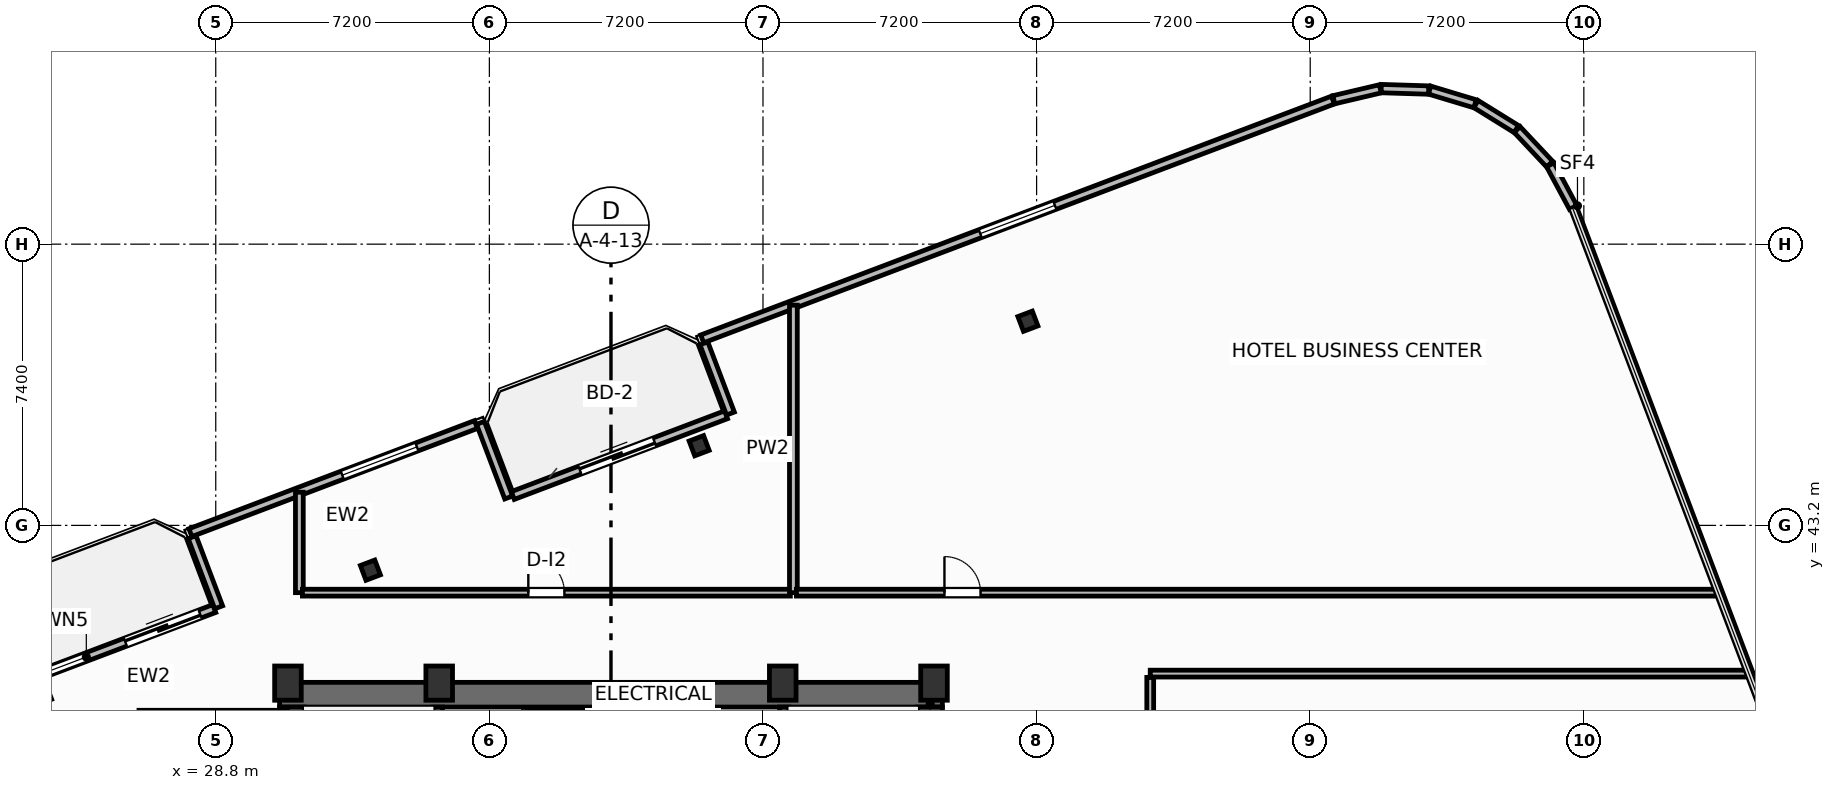
"""IFC4 building model, lengths in metres.
Left out: names, types, materials, properties, quantities, classifications, styles, units other than length and angle.
Written with IfcOpenShell. Run it as: python <this file> out.ifc"""

import sys

from ifc_helpers import new_model, si_unit, direction, frame, frame_2d, origin, origin_2d, place, context, subcontext, project, spatial, rectangle, i_section, extrude, element, fill, save


model = new_model("IFC4")
c1 = context("Model", 3, precision=1e-05, world=origin(), true_north=direction((0.0, 1.0)))
c2 = subcontext(c1, "Body", "Model", "MODEL_VIEW")
j1 = project(units=[si_unit("LENGTHUNIT", "METRE"), si_unit("PLANEANGLEUNIT", "RADIAN")], contexts=[c1])
p1 = place(None, origin())
s1 = spatial("IfcSite", under=j1, at=p1, CompositionType="ELEMENT")
p2 = place(p1, origin())
s2 = spatial("IfcBuilding", under=s1, at=p2, CompositionType="ELEMENT")
p3 = place(p2, frame((0.0, 0.0, 227.5)))
s3 = spatial("IfcBuildingStorey", under=s2, at=p3, CompositionType="ELEMENT", Elevation=227.5)
for number, where, z_axis, x_axis in (
    (1, (30.7, 39.05, 0.0), (0.0, 0.0, 1.0), (1.0, 0.0, 0.0)),
    (2, (34.68, 39.05, 0.0), (0.0, 0.0, 1.0), (1.0, 0.0, 0.0)),
    (3, (43.72, 39.05, 0.0), (0.0, 0.0, 1.0), (1.0, 0.0, 0.0)),
    (4, (47.7, 39.05, 0.0), (0.0, 0.0, 1.0), (1.0, 0.0, 0.0)),
):
    element("IfcColumn", number, at=place(p3, frame(where, z_axis=z_axis, x_axis=x_axis)), inside=s3, PredefinedType="COLUMN", context=c2, shape_type="SweptSolid", body=[
        extrude(rectangle(XDim=0.7, YDim=0.9, at=origin_2d()), origin(), (0.0, 0.0, 1.0), 3.7),
    ])
p4 = place(p3, frame((30.48, 38.745, 0.0), z_axis=(0.0, 0.0, 1.0), x_axis=(1.0, 0.0, 0.0)))
e5 = element("IfcWall", 5, at=p4, inside=s3, PredefinedType="SHEAR", context=c2, shape_type="SweptSolid", body=[
    extrude(rectangle(XDim=17.44, YDim=0.65, at=frame_2d((8.72, 0.0))), origin(), (0.0, 0.0, 1.0), 3.45),
])
for number, where, z_axis, x_axis in (
    (6, (30.805, 29.2, 0.0), (0.0, 0.0, 1.0), (0.0, 1.0, 0.0)),
    (7, (47.595, 29.2, 0.0), (0.0, 0.0, 1.0), (0.0, 1.0, 0.0)),
):
    element("IfcWall", number, at=place(p3, frame(where, z_axis=z_axis, x_axis=x_axis)), inside=s3, PredefinedType="SHEAR", context=c2, shape_type="SweptSolid", body=[
        extrude(rectangle(XDim=9.22, YDim=0.65, at=frame_2d((4.61, 0.0))), origin(), (0.0, 0.0, 1.0), 3.45),
    ])
p5 = place(p3, frame((34.64, 29.2, 0.0), z_axis=(0.0, 0.0, 1.0), x_axis=(0.0, 1.0, 0.0)))
e8 = element("IfcWall", 8, at=p5, inside=s3, PredefinedType="SHEAR", context=c2, shape_type="SweptSolid", body=[
    extrude(rectangle(XDim=9.22, YDim=0.25, at=frame_2d((4.61, 0.0))), origin(), (0.0, 0.0, 1.0), 3.45),
])
p6 = place(p5, frame((0.65, 0.0, 0.0)))
e9 = element("IfcOpeningElement", 9, at=p6, cuts=e8, PredefinedType="OPENING", context=c2, shape_type="SweptSolid", body=[
    extrude(rectangle(XDim=1.05, YDim=2.15, at=frame_2d((0.525, 1.075))), frame((0.0, 0.135, 0.0), z_axis=(0.0, -1.0, 0.0), x_axis=(1.0, 0.0, 0.0)), (0.0, 0.0, 1.0), 0.27),
])
p7 = place(p3, frame((43.76, 29.2, 0.0), z_axis=(0.0, 0.0, 1.0), x_axis=(0.0, 1.0, 0.0)))
e10 = element("IfcWall", 10, at=p7, inside=s3, PredefinedType="SHEAR", context=c2, shape_type="SweptSolid", body=[
    extrude(rectangle(XDim=9.22, YDim=0.25, at=frame_2d((4.61, 0.0))), origin(), (0.0, 0.0, 1.0), 3.45),
])
p8 = place(p7, frame((0.65, 0.0, 0.0)))
e11 = element("IfcOpeningElement", 11, at=p8, cuts=e10, PredefinedType="OPENING", context=c2, shape_type="SweptSolid", body=[
    extrude(rectangle(XDim=1.05, YDim=2.15, at=frame_2d((0.525, 1.075))), frame((0.0, 0.135, 0.0), z_axis=(0.0, -1.0, 0.0), x_axis=(1.0, 0.0, 0.0)), (0.0, 0.0, 1.0), 0.27),
])
for number, where, z_axis, x_axis in (
    (12, (50.171, 48.572, 0.0), (0.0, 0.0, 1.0), (0.935, 0.354, 0.0)),
    (13, (41.52, 45.297, 0.0), (0.0, 0.0, 1.0), (0.935, 0.354, 0.0)),
    (14, (32.869, 42.022, 0.0), (0.0, 0.0, 1.0), (0.935, 0.354, 0.0)),
):
    element("IfcColumn", number, at=place(p3, frame(where, z_axis=z_axis, x_axis=x_axis)), inside=s3, PredefinedType="COLUMN", context=c2, shape_type="SweptSolid", body=[
        extrude(i_section(OverallWidth=0.406, OverallDepth=0.416, WebThickness=0.03, FlangeThickness=0.048, FilletRadius=0.025, at=origin_2d()), origin(), (0.0, 0.0, 1.0), 3.7),
    ])
p9 = place(p3, frame((23.149, 38.887, 0.0), z_axis=(0.0, 0.0, 1.0), x_axis=(0.9352192676, 0.354069091436, 0.0)))
e15 = element("IfcWall", 15, at=p9, inside=s3, PredefinedType="SOLIDWALL", context=c2, shape_type="SweptSolid", body=[
    extrude(rectangle(XDim=6.0, YDim=0.22, at=frame_2d((3.0, 0.0))), origin(), (0.0, 0.0, 1.0), 2.73),
])
p10 = place(p9, frame((3.5, 0.0, 0.0)))
e16 = element("IfcOpeningElement", 16, at=p10, cuts=e15, PredefinedType="OPENING", context=c2, shape_type="SweptSolid", body=[
    extrude(rectangle(XDim=2.1, YDim=2.3, at=frame_2d((1.05, 1.15))), frame((0.0, 0.12, 0.0), z_axis=(0.0, -1.0, 0.0), x_axis=(1.0, 0.0, 0.0)), (0.0, 0.0, 1.0), 0.24),
])
p11 = place(p9, frame((0.55, 0.0, 0.75)))
e17 = element("IfcOpeningElement", 17, at=p11, cuts=e15, PredefinedType="OPENING", context=c2, shape_type="SweptSolid", body=[
    extrude(rectangle(XDim=1.85, YDim=1.75, at=frame_2d((0.925, 0.875))), frame((0.0, 0.12, 0.0), z_axis=(0.0, -1.0, 0.0), x_axis=(1.0, 0.0, 0.0)), (0.0, 0.0, 1.0), 0.24),
])
p12 = place(p3, frame((36.617, 43.986, 0.0), z_axis=(0.0, 0.0, 1.0), x_axis=(0.935227640088, 0.354046976001, 0.0)))
e18 = element("IfcWall", 18, at=p12, inside=s3, PredefinedType="SOLIDWALL", context=c2, shape_type="SweptSolid", body=[
    extrude(rectangle(XDim=6.0, YDim=0.22, at=frame_2d((3.0, 0.0))), origin(), (0.0, 0.0, 1.0), 2.73),
])
p13 = place(p12, frame((1.888, 0.0, 0.0)))
e19 = element("IfcOpeningElement", 19, at=p13, cuts=e18, PredefinedType="OPENING", context=c2, shape_type="SweptSolid", body=[
    extrude(rectangle(XDim=2.1, YDim=2.3, at=frame_2d((1.05, 1.15))), frame((0.0, 0.12, 0.0), z_axis=(0.0, -1.0, 0.0), x_axis=(1.0, 0.0, 0.0)), (0.0, 0.0, 1.0), 0.24),
])
p14 = place(p3, frame((64.519, 51.566, 0.0), z_axis=(0.0, 0.0, 1.0), x_axis=(-0.473093575122, 0.881012184466, 0.0)))
e20 = element("IfcWall", 20, at=p14, inside=s3, PredefinedType="SOLIDWALL", context=c2, shape_type="SweptSolid", body=[
    extrude(rectangle(XDim=1.274, YDim=0.22, at=frame_2d((0.637, 0.0))), origin(), (0.0, 0.0, 1.0), 2.73),
])
for number, where, z_axis, x_axis in (
    (21, (63.899, 52.706, 0.0), (0.0, 0.0, 1.0), (-0.685, 0.729, 0.0)),
    (22, (63.023, 53.629, 0.0), (0.0, 0.0, 1.0), (-0.85, 0.526, 0.0)),
):
    element("IfcWall", number, at=place(p3, frame(where, z_axis=z_axis, x_axis=x_axis)), inside=s3, PredefinedType="SOLIDWALL", context=c2, shape_type="SweptSolid", body=[
        extrude(rectangle(XDim=1.249, YDim=0.22, at=frame_2d((0.625, 0.0))), origin(), (0.0, 0.0, 1.0), 2.73),
    ])
for number, where, z_axis, x_axis in (
    (23, (61.937, 54.294, 0.0), (0.0, 0.0, 1.0), (-0.958, 0.288, 0.0)),
    (24, (60.717, 54.655, 0.0), (0.0, 0.0, 1.0), (-1.0, 0.031, 0.0)),
):
    element("IfcWall", number, at=place(p3, frame(where, z_axis=z_axis, x_axis=x_axis)), inside=s3, PredefinedType="SOLIDWALL", context=c2, shape_type="SweptSolid", body=[
        extrude(rectangle(XDim=1.249, YDim=0.22, at=frame_2d((0.624, 0.0))), origin(), (0.0, 0.0, 1.0), 2.73),
    ])
p15 = place(p3, frame((59.444, 54.688, 0.0), z_axis=(0.0, 0.0, 1.0), x_axis=(-0.973409523464, -0.229071821989, 0.0)))
e25 = element("IfcWall", 25, at=p15, inside=s3, PredefinedType="SOLIDWALL", context=c2, shape_type="SweptSolid", body=[
    extrude(rectangle(XDim=1.257, YDim=0.22, at=frame_2d((0.628, 0.0))), origin(), (0.0, 0.0, 1.0), 2.73),
])
p16 = place(p3, frame((58.198, 54.391, 0.0), z_axis=(0.0, 0.0, 1.0), x_axis=(-0.935223849772, -0.354056988094, 0.0)))
e26 = element("IfcWall", 26, at=p16, inside=s3, PredefinedType="SOLIDWALL", context=c2, shape_type="SweptSolid", body=[
    extrude(rectangle(XDim=17.747, YDim=0.22, at=frame_2d((8.874, 0.0))), origin(), (0.0, 0.0, 1.0), 2.73),
])
p17 = place(p16, frame((7.823, 0.0, 0.8)))
e27 = element("IfcOpeningElement", 27, at=p17, cuts=e26, PredefinedType="OPENING", context=c2, shape_type="SweptSolid", body=[
    extrude(rectangle(XDim=2.1, YDim=1.75, at=frame_2d((1.05, 0.875))), frame((0.0, 0.12, 0.0), z_axis=(0.0, -1.0, 0.0), x_axis=(1.0, 0.0, 0.0)), (0.0, 0.0, 1.0), 0.24),
])
p18 = place(p3, frame((41.645, 47.99, 0.0), z_axis=(0.0, 0.0, 1.0), x_axis=(0.354020680661, -0.935237594232, 0.0)))
e28 = element("IfcWall", 28, at=p18, inside=s3, PredefinedType="SOLIDWALL", context=c2, shape_type="SweptSolid", body=[
    extrude(rectangle(XDim=1.975, YDim=0.22, at=frame_2d((0.988, 0.0))), origin(), (0.0, 0.0, 1.0), 2.73),
])
p19 = place(p3, frame((36.508, 43.934, 0.0), z_axis=(0.0, 0.0, 1.0), x_axis=(-0.354128469405, 0.935196785258, 0.0)))
e29 = element("IfcWall", 29, at=p19, inside=s3, PredefinedType="SOLIDWALL", context=c2, shape_type="SweptSolid", body=[
    extrude(rectangle(XDim=2.1, YDim=0.22, at=frame_2d((1.05, 0.0))), origin(), (0.0, 0.0, 1.0), 2.73),
])
p20 = place(p3, frame((35.648, 45.854, 0.0), z_axis=(0.0, 0.0, 1.0), x_axis=(-0.935230796934, -0.354038636968, 0.0)))
e30 = element("IfcWall", 30, at=p20, inside=s3, PredefinedType="SOLIDWALL", context=c2, shape_type="SweptSolid", body=[
    extrude(rectangle(XDim=8.035, YDim=0.22, at=frame_2d((4.018, 0.0))), origin(), (0.0, 0.0, 1.0), 2.73),
])
p21 = place(p20, frame((1.662, 0.0, 0.8)))
e31 = element("IfcOpeningElement", 31, at=p21, cuts=e30, PredefinedType="OPENING", context=c2, shape_type="SweptSolid", body=[
    extrude(rectangle(XDim=2.1, YDim=1.75, at=frame_2d((1.05, 0.875))), frame((0.0, 0.12, 0.0), z_axis=(0.0, -1.0, 0.0), x_axis=(1.0, 0.0, 0.0)), (0.0, 0.0, 1.0), 0.24),
])
p22 = place(p3, frame((28.177, 42.892, 0.0), z_axis=(0.0, 0.0, 1.0), x_axis=(0.354061611705, -0.935222099352, 0.0)))
e32 = element("IfcWall", 32, at=p22, inside=s3, PredefinedType="SOLIDWALL", context=c2, shape_type="SweptSolid", body=[
    extrude(rectangle(XDim=1.975, YDim=0.22, at=frame_2d((0.987, 0.0))), origin(), (0.0, 0.0, 1.0), 2.73),
])
p23 = place(p3, frame((31.0, 41.43, 0.0), z_axis=(0.0, 0.0, 1.0), x_axis=(0.0, 1.0, 0.0)))
e33 = element("IfcWall", 33, at=p23, inside=s3, PredefinedType="PARTITIONING", context=c2, shape_type="SweptSolid", body=[
    extrude(rectangle(XDim=2.643, YDim=0.205, at=frame_2d((1.321, 0.0))), origin(), (0.0, 0.0, 1.0), 3.45),
])
p24 = place(p3, frame((31.08, 41.43, 0.0), z_axis=(0.0, 0.0, 1.0), x_axis=(1.0, 0.0, 0.0)))
e34 = element("IfcWall", 34, at=p24, inside=s3, PredefinedType="PARTITIONING", context=c2, shape_type="SweptSolid", body=[
    extrude(rectangle(XDim=12.84, YDim=0.18, at=frame_2d((6.42, 0.0))), origin(), (0.0, 0.0, 1.0), 3.018),
])
p25 = place(p24, frame((5.945, 0.0, 0.0)))
e35 = element("IfcOpeningElement", 35, at=p25, cuts=e34, PredefinedType="OPENING", context=c2, shape_type="SweptSolid", body=[
    extrude(rectangle(XDim=0.95, YDim=2.05, at=frame_2d((0.475, 1.025))), frame((0.0, 0.1, 0.0), z_axis=(0.0, -1.0, 0.0), x_axis=(1.0, 0.0, 0.0)), (0.0, 0.0, 1.0), 0.2),
])
p26 = place(p3, frame((44.0, 41.43, 0.0), z_axis=(0.0, 0.0, 1.0), x_axis=(0.0, 1.0, 0.0)))
e36 = element("IfcWall", 36, at=p26, inside=s3, PredefinedType="PARTITIONING", context=c2, shape_type="SweptSolid", body=[
    extrude(rectangle(XDim=7.564, YDim=0.205, at=frame_2d((3.782, 0.0))), origin(), (0.0, 0.0, 1.0), 3.45),
])
p27 = place(p3, frame((44.08, 41.43, 0.0), z_axis=(0.0, 0.0, 1.0), x_axis=(1.0, 0.0, 0.0)))
e37 = element("IfcWall", 37, at=p27, inside=s3, PredefinedType="PARTITIONING", context=c2, shape_type="SweptSolid", body=[
    extrude(rectangle(XDim=24.216, YDim=0.18, at=frame_2d((12.108, 0.0))), origin(), (0.0, 0.0, 1.0), 3.45),
])
p28 = place(p27, frame((3.895, 0.0, 0.0)))
e38 = element("IfcOpeningElement", 38, at=p28, cuts=e37, PredefinedType="OPENING", context=c2, shape_type="SweptSolid", body=[
    extrude(rectangle(XDim=0.95, YDim=2.05, at=frame_2d((0.475, 1.025))), frame((0.0, 0.1, 0.0), z_axis=(0.0, -1.0, 0.0), x_axis=(1.0, 0.0, 0.0)), (0.0, 0.0, 1.0), 0.2),
])
p29 = place(p3, frame((53.39, 27.53, 0.0), z_axis=(0.0, 0.0, 1.0), x_axis=(0.0, 1.0, 0.0)))
e39 = element("IfcWall", 39, at=p29, inside=s3, PredefinedType="PARTITIONING", context=c2, shape_type="SweptSolid", body=[
    extrude(rectangle(XDim=11.67, YDim=0.18, at=frame_2d((5.835, 0.0))), origin(), (0.0, 0.0, 1.0), 3.45),
])
p30 = place(p29, frame((5.8, 0.0, 0.0)))
e40 = element("IfcOpeningElement", 40, at=p30, cuts=e39, PredefinedType="OPENING", context=c2, shape_type="SweptSolid", body=[
    extrude(rectangle(XDim=0.92, YDim=2.05, at=frame_2d((0.46, 1.025))), frame((0.0, 0.1, 0.0), z_axis=(0.0, -1.0, 0.0), x_axis=(1.0, 0.0, 0.0)), (0.0, 0.0, 1.0), 0.2),
])
p31 = place(p3, frame((53.39, 39.3, 0.0), z_axis=(0.0, 0.0, 1.0), x_axis=(1.0, 0.0, 0.0)))
e41 = element("IfcWall", 41, at=p31, inside=s3, PredefinedType="PARTITIONING", context=c2, shape_type="SweptSolid", body=[
    extrude(rectangle(XDim=15.713, YDim=0.18, at=frame_2d((7.856, 0.0))), origin(), (0.0, 0.0, 1.0), 3.45),
])
p32 = place(p10, origin())
e42 = element("IfcDoor", 42, at=p32, inside=s3, OperationType="SLIDING_TO_LEFT", PredefinedType="DOOR", context=c2, shape_type="SweptSolid", body=[
    extrude(rectangle(XDim=2.1, YDim=2.3, at=frame_2d((1.05, 1.15))), frame((0.0, 0.025, 0.0), z_axis=(0.0, -1.0, 0.0), x_axis=(1.0, 0.0, 0.0)), (0.0, 0.0, 1.0), 0.05),
])
fill(e16, e42)
p33 = place(p11, origin())
e43 = element("IfcWindow", 43, at=p33, inside=s3, PartitioningType="SINGLE_PANEL", PredefinedType="WINDOW", context=c2, shape_type="SweptSolid", body=[
    extrude(rectangle(XDim=1.85, YDim=1.75, at=frame_2d((0.925, 0.875))), frame((0.0, 0.03, 0.0), z_axis=(0.0, -1.0, 0.0), x_axis=(1.0, 0.0, 0.0)), (0.0, 0.0, 1.0), 0.06),
])
fill(e17, e43)
p34 = place(p13, origin())
e44 = element("IfcDoor", 44, at=p34, inside=s3, OperationType="SLIDING_TO_LEFT", PredefinedType="DOOR", context=c2, shape_type="SweptSolid", body=[
    extrude(rectangle(XDim=2.1, YDim=2.3, at=frame_2d((1.05, 1.15))), frame((0.0, 0.025, 0.0), z_axis=(0.0, -1.0, 0.0), x_axis=(1.0, 0.0, 0.0)), (0.0, 0.0, 1.0), 0.05),
])
fill(e19, e44)
p35 = place(p17, origin())
e45 = element("IfcWindow", 45, at=p35, inside=s3, PartitioningType="SINGLE_PANEL", PredefinedType="WINDOW", context=c2, shape_type="SweptSolid", body=[
    extrude(rectangle(XDim=2.1, YDim=1.75, at=frame_2d((1.05, 0.875))), frame((0.0, 0.03, 0.0), z_axis=(0.0, -1.0, 0.0), x_axis=(1.0, 0.0, 0.0)), (0.0, 0.0, 1.0), 0.06),
])
fill(e27, e45)
p36 = place(p21, origin())
e46 = element("IfcWindow", 46, at=p36, inside=s3, PartitioningType="SINGLE_PANEL", PredefinedType="WINDOW", context=c2, shape_type="SweptSolid", body=[
    extrude(rectangle(XDim=2.1, YDim=1.75, at=frame_2d((1.05, 0.875))), frame((0.0, 0.03, 0.0), z_axis=(0.0, -1.0, 0.0), x_axis=(1.0, 0.0, 0.0)), (0.0, 0.0, 1.0), 0.06),
])
fill(e31, e46)
p37 = place(p25, origin())
e47 = element("IfcDoor", 47, at=p37, inside=s3, OperationType="SINGLE_SWING_LEFT", PredefinedType="DOOR", context=c2, shape_type="SweptSolid", body=[
    extrude(rectangle(XDim=0.95, YDim=2.05, at=frame_2d((0.475, 1.025))), frame((0.0, 0.025, 0.0), z_axis=(0.0, -1.0, 0.0), x_axis=(1.0, 0.0, 0.0)), (0.0, 0.0, 1.0), 0.05),
])
fill(e35, e47)
p38 = place(p28, origin())
e48 = element("IfcDoor", 48, at=p38, inside=s3, OperationType="SINGLE_SWING_LEFT", PredefinedType="DOOR", context=c2, shape_type="SweptSolid", body=[
    extrude(rectangle(XDim=0.95, YDim=2.05, at=frame_2d((0.475, 1.025))), frame((0.0, 0.025, 0.0), z_axis=(0.0, -1.0, 0.0), x_axis=(1.0, 0.0, 0.0)), (0.0, 0.0, 1.0), 0.05),
])
fill(e38, e48)
save(model, sys.argv[1])
